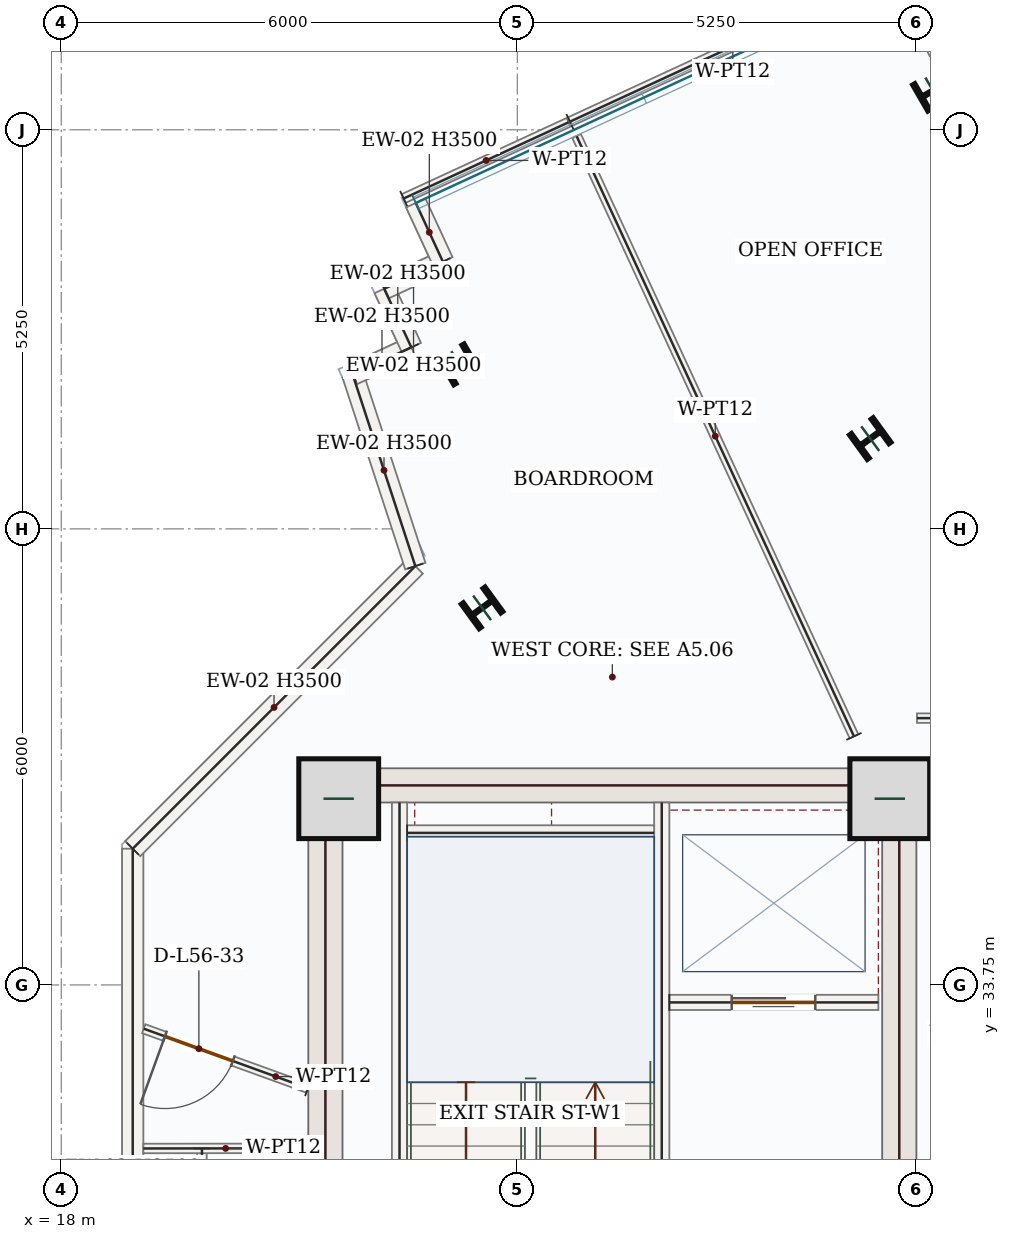
"""IFC4 building model, lengths in metres.
Left out: names, types, materials, properties, quantities, classifications, styles, units other than length and angle.
Written with IfcOpenShell. Run it as: python <this file> out.ifc"""

import sys

from ifc_helpers import new_model, si_unit, direction, frame, frame_2d, origin, origin_2d, place, context, subcontext, project, spatial, rectangle, i_section, extrude, source, transform, mapped, element, fill, save


model = new_model("IFC4")
c1 = context("Model", 3, precision=1e-05, world=origin(), true_north=direction((0.0, 1.0)))
c2 = subcontext(c1, "Body", "Model", "MODEL_VIEW")
j1 = project(units=[si_unit("LENGTHUNIT", "METRE"), si_unit("PLANEANGLEUNIT", "RADIAN")], contexts=[c1])
p1 = place(None, origin())
s1 = spatial("IfcSite", under=j1, at=p1, CompositionType="ELEMENT")
p2 = place(p1, origin())
s2 = spatial("IfcBuilding", under=s1, at=p2, CompositionType="ELEMENT")
p3 = place(p2, frame((0.0, 0.0, 239.1)))
s3 = spatial("IfcBuildingStorey", under=s2, at=p3, CompositionType="ELEMENT", Elevation=239.1)
m1 = source(origin(), c2, "Body", "SweptSolid", [
    extrude(rectangle(XDim=8.55, YDim=0.45, at=frame_2d((4.275, 0.0))), origin(), (0.0, 0.0, 1.0), 3.5),
])
p4 = place(p3, frame((21.475, 28.05, 0.0), z_axis=(0.0, 0.0, 1.0), x_axis=(0.0, 1.0, 0.0)))
e1 = element("IfcWall", 1, at=p4, inside=s3, PredefinedType="SHEAR", context=c2, shape_type="MappedRepresentation", body=[
    mapped(m1, transform((0.0, 0.0, 0.0), x_axis=(1.0, 0.0, 0.0), y_axis=(0.0, 1.0, 0.0), z_axis=(0.0, 0.0, 1.0), scale=1.0)),
])
p5 = place(p3, frame((29.025, 28.05, 0.0), z_axis=(0.0, 0.0, 1.0), x_axis=(0.0, 1.0, 0.0)))
e2 = element("IfcWall", 2, at=p5, inside=s3, PredefinedType="SHEAR", context=c2, shape_type="SweptSolid", body=[
    extrude(rectangle(XDim=8.55, YDim=0.45, at=frame_2d((4.275, 0.0))), origin(), (0.0, 0.0, 1.0), 3.5),
])
p6 = place(p5, frame((1.5, 0.0, 0.0)))
e3 = element("IfcOpeningElement", 3, at=p6, cuts=e2, PredefinedType="OPENING", context=c2, shape_type="SweptSolid", body=[
    extrude(rectangle(XDim=1.1, YDim=2.2, at=frame_2d((0.55, 1.1))), frame((0.0, 0.235, 0.0), z_axis=(0.0, -1.0, 0.0), x_axis=(1.0, 0.0, 0.0)), (0.0, 0.0, 1.0), 0.47),
])
m2 = source(origin(), c2, "Body", "SweptSolid", [
    extrude(rectangle(XDim=7.1, YDim=0.45, at=frame_2d((3.55, 0.0))), origin(), (0.0, 0.0, 1.0), 3.5),
])
p7 = place(p3, frame((21.7, 36.375, 0.0), z_axis=(0.0, 0.0, 1.0), x_axis=(1.0, 0.0, 0.0)))
e4 = element("IfcWall", 4, at=p7, inside=s3, PredefinedType="SHEAR", context=c2, shape_type="MappedRepresentation", body=[
    mapped(m2, transform((0.0, 0.0, 0.0), x_axis=(1.0, 0.0, 0.0), y_axis=(0.0, 1.0, 0.0), z_axis=(0.0, 0.0, 1.0), scale=1.0)),
])
m3 = source(origin(), c2, "Body", "SweptSolid", [
    extrude(rectangle(XDim=1.05, YDim=1.05, at=origin_2d()), origin(), (0.0, 0.0, 1.0), 3.75),
])
for number, where, z_axis, x_axis in (
    (5, (21.65, 36.2, 0.0), (0.0, 0.0, 1.0), (1.0, 0.0, 0.0)),
    (6, (28.9, 36.2, 0.0), (0.0, 0.0, 1.0), (1.0, 0.0, 0.0)),
):
    element("IfcColumn", number, at=place(p3, frame(where, z_axis=z_axis, x_axis=x_axis)), inside=s3, PredefinedType="COLUMN", context=c2, shape_type="MappedRepresentation", body=[
        mapped(m3, transform((0.0, 0.0, 0.0), x_axis=(1.0, 0.0, 0.0), y_axis=(0.0, 1.0, 0.0), z_axis=(0.0, 0.0, 1.0), scale=1.0)),
    ])
m4 = source(origin(), c2, "Body", "SweptSolid", [
    extrude(i_section(OverallWidth=0.399, OverallDepth=0.386, WebThickness=0.021, FlangeThickness=0.033, FilletRadius=0.018, at=origin_2d()), origin(), (0.0, 0.0, 1.0), 3.75),
])
for number, where, z_axis, x_axis in (
    (7, (28.643, 40.937, 0.0), (0.0, 0.0, 1.0), (-0.588, 0.809, 0.0)),
    (8, (23.536, 38.711, 0.0), (0.0, 0.0, 1.0), (-0.588, 0.809, 0.0)),
    (9, (29.468, 45.514, 0.0), (0.0, 0.0, 1.0), (-0.5, 0.866, 0.0)),
    (10, (23.232, 41.914, 0.0), (0.0, 0.0, 1.0), (-0.5, 0.866, 0.0)),
):
    element("IfcColumn", number, at=place(p3, frame(where, z_axis=z_axis, x_axis=x_axis)), inside=s3, PredefinedType="COLUMN", context=c2, shape_type="MappedRepresentation", body=[
        mapped(m4, transform((0.0, 0.0, 0.0), x_axis=(1.0, 0.0, 0.0), y_axis=(0.0, 1.0, 0.0), z_axis=(0.0, 0.0, 1.0), scale=1.0)),
    ])
m5 = source(origin(), c2, "Body", "SweptSolid", [
    extrude(rectangle(XDim=9.088, YDim=0.28, at=frame_2d((4.544, 0.0))), origin(), (0.0, 0.0, 1.0), 3.5),
])
p8 = place(p3, frame((18.94, 26.454, 0.0), z_axis=(0.0, 0.0, 1.0), x_axis=(0.0, 1.0, 0.0)))
e11 = element("IfcWall", 11, at=p8, inside=s3, PredefinedType="SOLIDWALL", context=c2, shape_type="MappedRepresentation", body=[
    mapped(m5, transform((0.0, 0.0, 0.0), x_axis=(1.0, 0.0, 0.0), y_axis=(0.0, 1.0, 0.0), z_axis=(0.0, 0.0, 1.0), scale=1.0)),
])
m6 = source(origin(), c2, "Body", "SweptSolid", [
    extrude(rectangle(XDim=5.258, YDim=0.28, at=frame_2d((2.629, 0.0))), origin(), (0.0, 0.0, 1.0), 3.5),
])
p9 = place(p3, frame((18.94, 35.542, 0.0), z_axis=(0.0, 0.0, 1.0), x_axis=(0.707106781187, 0.707106781187, 0.0)))
e12 = element("IfcWall", 12, at=p9, inside=s3, PredefinedType="SOLIDWALL", context=c2, shape_type="MappedRepresentation", body=[
    mapped(m6, transform((0.0, 0.0, 0.0), x_axis=(1.0, 0.0, 0.0), y_axis=(0.0, 1.0, 0.0), z_axis=(0.0, 0.0, 1.0), scale=1.0)),
])
m7 = source(origin(), c2, "Body", "SweptSolid", [
    extrude(rectangle(XDim=2.652, YDim=0.28, at=frame_2d((1.326, 0.0))), origin(), (0.0, 0.0, 1.0), 3.5),
])
p10 = place(p3, frame((22.658, 39.26, 0.0), z_axis=(0.0, 0.0, 1.0), x_axis=(-0.310838004308, 0.950462905682, 0.0)))
e13 = element("IfcWall", 13, at=p10, inside=s3, PredefinedType="SOLIDWALL", context=c2, shape_type="MappedRepresentation", body=[
    mapped(m7, transform((0.0, 0.0, 0.0), x_axis=(1.0, 0.0, 0.0), y_axis=(0.0, 1.0, 0.0), z_axis=(0.0, 0.0, 1.0), scale=1.0)),
])
m8 = source(origin(), c2, "Body", "SweptSolid", [
    extrude(rectangle(XDim=0.85, YDim=0.28, at=frame_2d((0.425, 0.0))), origin(), (0.0, 0.0, 1.0), 3.5),
])
for number, where, z_axis, x_axis in (
    (14, (21.833, 41.781, 0.0), (0.0, 0.0, 1.0), (0.908, 0.419, 0.0)),
    (15, (22.605, 42.137, 0.0), (0.0, 0.0, 1.0), (-0.419, 0.908, 0.0)),
):
    element("IfcWall", number, at=place(p3, frame(where, z_axis=z_axis, x_axis=x_axis)), inside=s3, PredefinedType="SOLIDWALL", context=c2, shape_type="MappedRepresentation", body=[
        mapped(m8, transform((0.0, 0.0, 0.0), x_axis=(1.0, 0.0, 0.0), y_axis=(0.0, 1.0, 0.0), z_axis=(0.0, 0.0, 1.0), scale=1.0)),
    ])
m9 = source(origin(), c2, "Body", "SweptSolid", [
    extrude(rectangle(XDim=0.85, YDim=0.28, at=frame_2d((0.425, 0.0))), origin(), (0.0, 0.0, 1.0), 3.5),
])
p11 = place(p3, frame((22.249, 42.909, 0.0), z_axis=(0.0, 0.0, 1.0), x_axis=(0.907791150023, 0.419422493365, 0.0)))
e16 = element("IfcWall", 16, at=p11, inside=s3, PredefinedType="SOLIDWALL", context=c2, shape_type="MappedRepresentation", body=[
    mapped(m9, transform((0.0, 0.0, 0.0), x_axis=(1.0, 0.0, 0.0), y_axis=(0.0, 1.0, 0.0), z_axis=(0.0, 0.0, 1.0), scale=1.0)),
])
p12 = place(p3, frame((23.02, 43.266, 0.0), z_axis=(0.0, 0.0, 1.0), x_axis=(-0.419313139191, 0.907841666427, 0.0)))
e17 = element("IfcWall", 17, at=p12, inside=s3, PredefinedType="SOLIDWALL", context=c2, shape_type="MappedRepresentation", body=[
    mapped(m8, transform((0.0, 0.0, 0.0), x_axis=(1.0, 0.0, 0.0), y_axis=(0.0, 1.0, 0.0), z_axis=(0.0, 0.0, 1.0), scale=1.0)),
])
m10 = source(origin(), c2, "Body", "SweptSolid", [
    extrude(rectangle(XDim=7.87, YDim=0.2, at=frame_2d((3.935, 0.0))), origin(), (0.0, 0.0, 1.0), 3.5),
])
p13 = place(p3, frame((22.45, 28.28, 0.0), z_axis=(0.0, 0.0, 1.0), x_axis=(0.0, 1.0, 0.0)))
e18 = element("IfcWall", 18, at=p13, inside=s3, PredefinedType="SOLIDWALL", context=c2, shape_type="MappedRepresentation", body=[
    mapped(m10, transform((0.0, 0.0, 0.0), x_axis=(1.0, 0.0, 0.0), y_axis=(0.0, 1.0, 0.0), z_axis=(0.0, 0.0, 1.0), scale=1.0)),
])
p14 = place(p3, frame((25.9, 28.15, 0.0), z_axis=(0.0, 0.0, 1.0), x_axis=(0.0, 1.0, 0.0)))
e19 = element("IfcWall", 19, at=p14, inside=s3, PredefinedType="SOLIDWALL", context=c2, shape_type="SweptSolid", body=[
    extrude(rectangle(XDim=8.0, YDim=0.2, at=frame_2d((4.0, 0.0))), origin(), (0.0, 0.0, 1.0), 3.5),
])
p15 = place(p14, frame((0.4, 0.0, 0.0)))
e20 = element("IfcOpeningElement", 20, at=p15, cuts=e19, PredefinedType="OPENING", context=c2, shape_type="SweptSolid", body=[
    extrude(rectangle(XDim=1.05, YDim=2.15, at=frame_2d((0.525, 1.075))), frame((0.0, 0.11, 0.0), z_axis=(0.0, -1.0, 0.0), x_axis=(1.0, 0.0, 0.0)), (0.0, 0.0, 1.0), 0.22),
])
m11 = source(origin(), c2, "Body", "SweptSolid", [
    extrude(rectangle(XDim=3.25, YDim=0.2, at=frame_2d((1.625, 0.0))), origin(), (0.0, 0.0, 1.0), 3.5),
])
p16 = place(p3, frame((22.55, 35.75, 0.0), z_axis=(0.0, 0.0, 1.0), x_axis=(1.0, 0.0, 0.0)))
e21 = element("IfcWall", 21, at=p16, inside=s3, PredefinedType="SOLIDWALL", context=c2, shape_type="MappedRepresentation", body=[
    mapped(m11, transform((0.0, 0.0, 0.0), x_axis=(1.0, 0.0, 0.0), y_axis=(0.0, 1.0, 0.0), z_axis=(0.0, 0.0, 1.0), scale=1.0)),
])
p17 = place(p3, frame((26.0, 33.52, 0.0), z_axis=(0.0, 0.0, 1.0), x_axis=(1.0, 0.0, 0.0)))
e22 = element("IfcWall", 22, at=p17, inside=s3, PredefinedType="SOLIDWALL", context=c2, shape_type="SweptSolid", body=[
    extrude(rectangle(XDim=2.75, YDim=0.2, at=frame_2d((1.375, 0.0))), origin(), (0.0, 0.0, 1.0), 3.5),
])
p18 = place(p17, frame((0.82, 0.0, 0.0)))
e23 = element("IfcOpeningElement", 23, at=p18, cuts=e22, PredefinedType="OPENING", context=c2, shape_type="SweptSolid", body=[
    extrude(rectangle(XDim=1.1, YDim=2.15, at=frame_2d((0.55, 1.075))), frame((0.0, 0.11, 0.0), z_axis=(0.0, -1.0, 0.0), x_axis=(1.0, 0.0, 0.0)), (0.0, 0.0, 1.0), 0.22),
])
p19 = place(p3, frame((33.443, 37.26, 0.0), z_axis=(0.0, 0.0, 1.0), x_axis=(-0.999999998299, -5.8329445e-05, 0.0)))
e24 = element("IfcWall", 24, at=p19, inside=s3, PredefinedType="PARTITIONING", context=c2, shape_type="SweptSolid", body=[
    extrude(rectangle(XDim=4.186, YDim=0.125, at=frame_2d((2.093, 0.0))), origin(), (0.0, 0.0, 1.0), 3.5),
])
p20 = place(p19, frame((0.712, 0.0, 0.0)))
e25 = element("IfcOpeningElement", 25, at=p20, cuts=e24, PredefinedType="OPENING", context=c2, shape_type="SweptSolid", body=[
    extrude(rectangle(XDim=0.95, YDim=2.15, at=frame_2d((0.475, 1.075))), frame((0.0, 0.073, 0.0), z_axis=(0.0, -1.0, 0.0), x_axis=(1.0, 0.0, 0.0)), (0.0, 0.0, 1.0), 0.145),
])
m12 = source(origin(), c2, "Body", "SweptSolid", [
    extrude(rectangle(XDim=8.701, YDim=0.125, at=frame_2d((4.351, 0.0))), origin(), (0.0, 0.0, 1.0), 3.5),
])
p21 = place(p3, frame((28.429, 37.02, 0.0), z_axis=(0.0, 0.0, 1.0), x_axis=(-0.419458495046, 0.907774515468, 0.0)))
e26 = element("IfcWall", 26, at=p21, inside=s3, PredefinedType="PARTITIONING", context=c2, shape_type="MappedRepresentation", body=[
    mapped(m12, transform((0.0, 0.0, 0.0), x_axis=(1.0, 0.0, 0.0), y_axis=(0.0, 1.0, 0.0), z_axis=(0.0, 0.0, 1.0), scale=1.0)),
])
m13 = source(origin(), c2, "Body", "SweptSolid", [
    extrude(rectangle(XDim=4.72, YDim=0.125, at=frame_2d((2.36, 0.0))), origin(), (0.0, 0.0, 1.0), 3.5),
])
p22 = place(p3, frame((24.692, 45.107, 0.0), z_axis=(0.0, 0.0, 1.0), x_axis=(0.907753377062, 0.419504238873, 0.0)))
e27 = element("IfcWall", 27, at=p22, inside=s3, PredefinedType="PARTITIONING", context=c2, shape_type="MappedRepresentation", body=[
    mapped(m13, transform((0.0, 0.0, 0.0), x_axis=(1.0, 0.0, 0.0), y_axis=(0.0, 1.0, 0.0), z_axis=(0.0, 0.0, 1.0), scale=1.0)),
])
m14 = source(origin(), c2, "Body", "SweptSolid", [
    extrude(rectangle(XDim=0.996, YDim=0.125, at=frame_2d((0.498, 0.0))), origin(), (0.0, 0.0, 1.0), 3.5),
])
p23 = place(p3, frame((29.064, 46.898, 0.0), z_axis=(0.0, 0.0, 1.0), x_axis=(0.419540149112, -0.907736780836, 0.0)))
e28 = element("IfcWall", 28, at=p23, inside=s3, PredefinedType="PARTITIONING", context=c2, shape_type="MappedRepresentation", body=[
    mapped(m14, transform((0.0, 0.0, 0.0), x_axis=(1.0, 0.0, 0.0), y_axis=(0.0, 1.0, 0.0), z_axis=(0.0, 0.0, 1.0), scale=1.0)),
])
p24 = place(p3, frame((21.245, 32.391, 0.0), z_axis=(0.0, 0.0, 1.0), x_axis=(-0.940115637779, 0.340855669755, 0.0)))
e29 = element("IfcWall", 29, at=p24, inside=s3, PredefinedType="PARTITIONING", context=c2, shape_type="SweptSolid", body=[
    extrude(rectangle(XDim=2.298, YDim=0.125, at=frame_2d((1.149, 0.0))), origin(), (0.0, 0.0, 1.0), 3.5),
])
p25 = place(p24, frame((1.051, 0.0, 0.0)))
e30 = element("IfcOpeningElement", 30, at=p25, cuts=e29, PredefinedType="OPENING", context=c2, shape_type="SweptSolid", body=[
    extrude(rectangle(XDim=0.95, YDim=2.15, at=frame_2d((0.475, 1.075))), frame((0.0, 0.073, 0.0), z_axis=(0.0, -1.0, 0.0), x_axis=(1.0, 0.0, 0.0)), (0.0, 0.0, 1.0), 0.145),
])
m15 = source(origin(), c2, "Body", "SweptSolid", [
    extrude(rectangle(XDim=2.39, YDim=0.125, at=frame_2d((1.195, 0.0))), origin(), (0.0, 0.0, 1.0), 3.5),
])
p26 = place(p3, frame((22.505, 44.096, 0.0), z_axis=(0.0, 0.0, 1.0), x_axis=(0.907773916688, 0.419459790898, 0.0)))
e31 = element("IfcWall", 31, at=p26, inside=s3, PredefinedType="PARTITIONING", context=c2, shape_type="MappedRepresentation", body=[
    mapped(m15, transform((0.0, 0.0, 0.0), x_axis=(1.0, 0.0, 0.0), y_axis=(0.0, 1.0, 0.0), z_axis=(0.0, 0.0, 1.0), scale=1.0)),
])
p27 = place(p3, frame((19.851, 31.599, 0.0), z_axis=(0.0, 0.0, 1.0), x_axis=(-7.9685508e-05, -0.999999996825, 0.0)))
e32 = element("IfcWall", 32, at=p27, inside=s3, PredefinedType="PARTITIONING", context=c2, shape_type="SweptSolid", body=[
    extrude(rectangle(XDim=9.191, YDim=0.125, at=frame_2d((4.596, 0.0))), origin(), (0.0, 0.0, 1.0), 3.5),
])
p28 = place(p27, frame((5.357, 0.0, 0.0)))
e33 = element("IfcOpeningElement", 33, at=p28, cuts=e32, PredefinedType="OPENING", context=c2, shape_type="SweptSolid", body=[
    extrude(rectangle(XDim=0.95, YDim=2.15, at=frame_2d((0.475, 1.075))), frame((0.0, 0.073, 0.0), z_axis=(0.0, -1.0, 0.0), x_axis=(1.0, 0.0, 0.0)), (0.0, 0.0, 1.0), 0.145),
])
m16 = source(origin(), c2, "Body", "SweptSolid", [
    extrude(rectangle(XDim=2.165, YDim=0.125, at=frame_2d((1.083, 0.0))), origin(), (0.0, 0.0, 1.0), 3.5),
])
p29 = place(p3, frame((21.245, 31.6, 0.0), z_axis=(0.0, 0.0, 1.0), x_axis=(-0.999999688459, -0.000789354738, 0.0)))
e34 = element("IfcWall", 34, at=p29, inside=s3, PredefinedType="PARTITIONING", context=c2, shape_type="MappedRepresentation", body=[
    mapped(m16, transform((0.0, 0.0, 0.0), x_axis=(1.0, 0.0, 0.0), y_axis=(0.0, 1.0, 0.0), z_axis=(0.0, 0.0, 1.0), scale=1.0)),
])
m17 = source(origin(), c2, "Body", "SweptSolid", [
    extrude(rectangle(XDim=1.1, YDim=2.15, at=frame_2d((0.55, 1.075))), frame((0.0, 0.025, 0.0), z_axis=(0.0, -1.0, 0.0), x_axis=(1.0, 0.0, 0.0)), (0.0, 0.0, 1.0), 0.05),
])
p30 = place(p18, origin())
e35 = element("IfcDoor", 35, at=p30, inside=s3, OperationType="DOUBLE_DOOR_SLIDING", PredefinedType="DOOR", context=c2, shape_type="MappedRepresentation", body=[
    mapped(m17, transform((0.0, 0.0, 0.0), x_axis=(1.0, 0.0, 0.0), y_axis=(0.0, 1.0, 0.0), z_axis=(0.0, 0.0, 1.0), scale=1.0)),
])
fill(e23, e35)
m18 = source(origin(), c2, "Body", "SweptSolid", [
    extrude(rectangle(XDim=0.95, YDim=2.15, at=frame_2d((0.475, 1.075))), frame((0.0, 0.025, 0.0), z_axis=(0.0, -1.0, 0.0), x_axis=(1.0, 0.0, 0.0)), (0.0, 0.0, 1.0), 0.05),
])
p31 = place(p25, origin())
e36 = element("IfcDoor", 36, at=p31, inside=s3, OperationType="SINGLE_SWING_RIGHT", PredefinedType="DOOR", context=c2, shape_type="MappedRepresentation", body=[
    mapped(m18, transform((0.0, 0.0, 0.0), x_axis=(1.0, 0.0, 0.0), y_axis=(0.0, 1.0, 0.0), z_axis=(0.0, 0.0, 1.0), scale=1.0)),
])
fill(e30, e36)
save(model, sys.argv[1])
